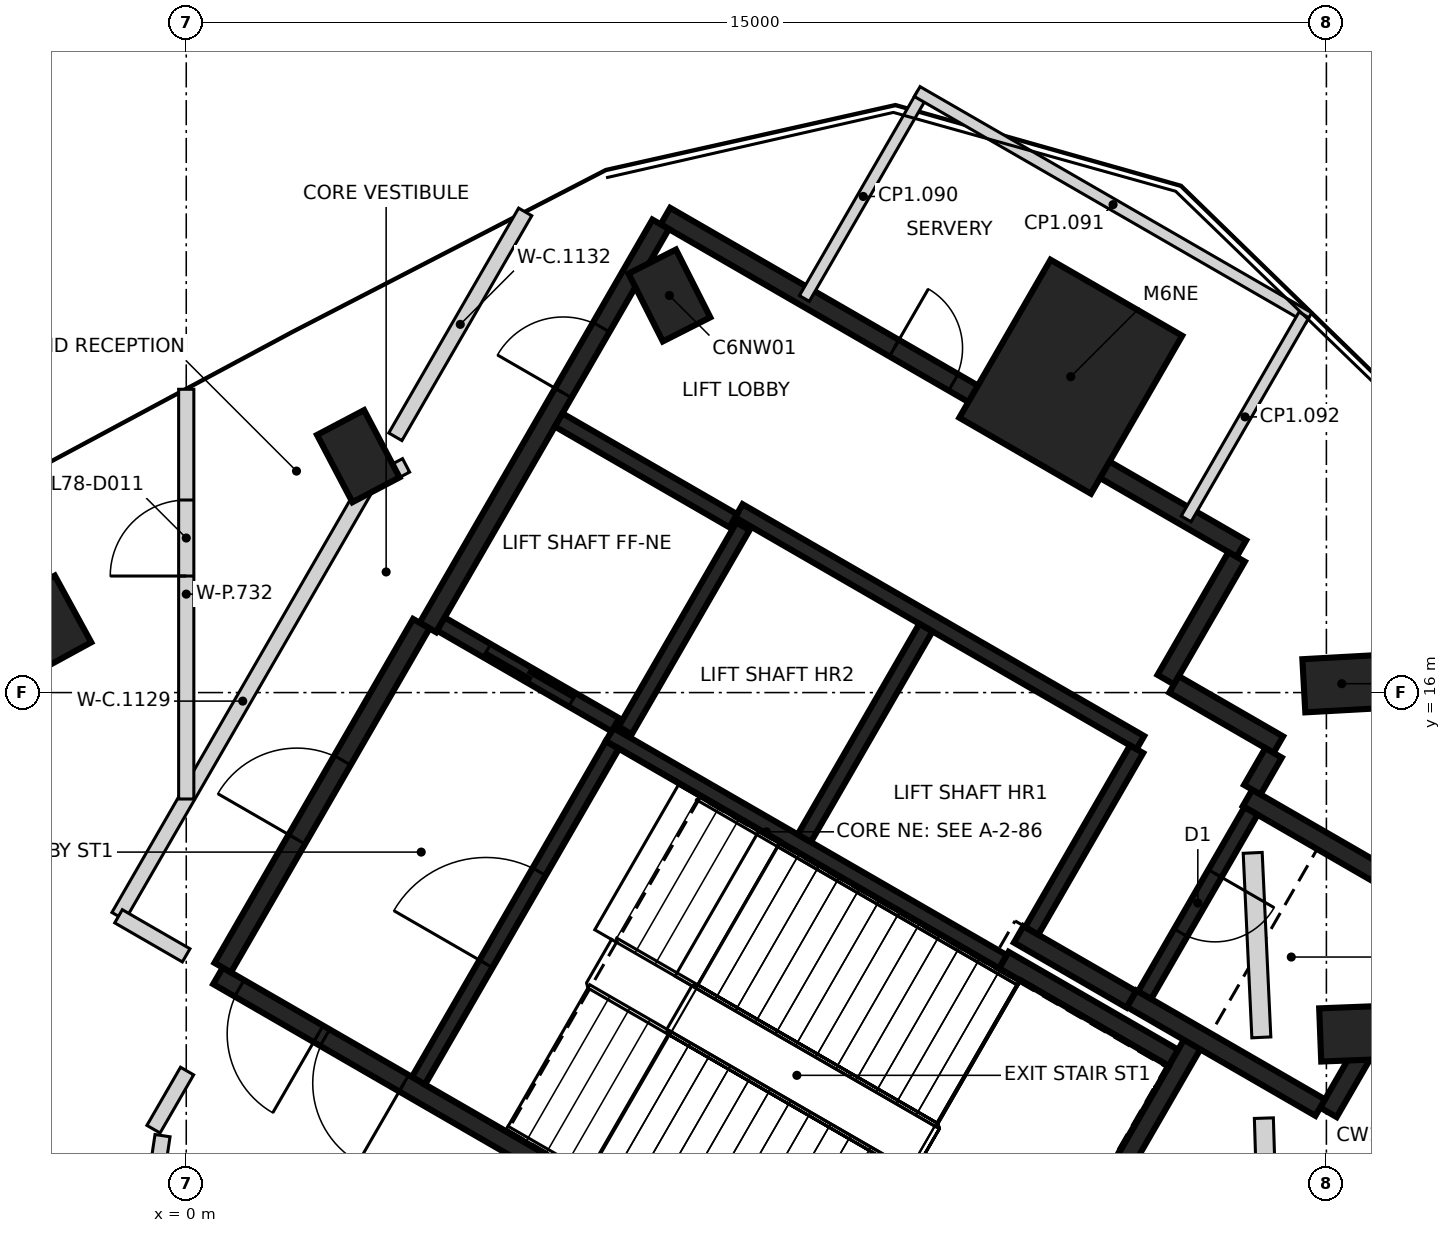
"""IFC4 building model, lengths in metres.
Left out: names, types, materials, properties, quantities, classifications, styles, units other than length and angle.
Written with IfcOpenShell. Run it as: python <this file> out.ifc"""

import sys

from ifc_helpers import new_model, si_unit, direction, frame, frame_2d, origin, origin_2d, place, context, subcontext, project, spatial, rectangle, extrude, element, fill, save


model = new_model("IFC4")
c1 = context("Model", 3, precision=1e-05, world=origin(), true_north=direction((0.0, 1.0)))
c2 = subcontext(c1, "Body", "Model", "MODEL_VIEW")
j1 = project(units=[si_unit("LENGTHUNIT", "METRE"), si_unit("PLANEANGLEUNIT", "RADIAN")], contexts=[c1])
p1 = place(None, origin())
s1 = spatial("IfcSite", under=j1, at=p1, CompositionType="ELEMENT")
p2 = place(p1, origin())
s2 = spatial("IfcBuilding", under=s1, at=p2, CompositionType="ELEMENT")
p3 = place(p2, frame((0.0, 0.0, 312.6)))
s3 = spatial("IfcBuildingStorey", under=s2, at=p3, CompositionType="ELEMENT", Elevation=312.6)
for number, where, z_axis, x_axis in (
    (1, (15.418, 11.515, -0.35), (0.0, 0.0, 1.0), (0.999, 0.039, 0.0)),
    (2, (15.202, 16.117, -0.35), (0.0, 0.0, 1.0), (0.998, 0.055, 0.0)),
    (3, (6.356, 21.224, -0.35), (0.0, 0.0, 1.0), (-0.452, 0.892, 0.0)),
    (4, (2.263, 19.11, -0.35), (0.0, 0.0, 1.0), (-0.466, 0.885, 0.0)),
    (5, (-1.797, 16.932, -0.35), (0.0, 0.0, 1.0), (-0.479, 0.878, 0.0)),
):
    element("IfcColumn", number, at=place(p3, frame(where, z_axis=z_axis, x_axis=x_axis)), inside=s3, PredefinedType="COLUMN", context=c2, shape_type="SweptSolid", body=[
        extrude(rectangle(XDim=1.0, YDim=0.7, at=origin_2d()), origin(), (0.0, 0.0, 1.0), 8.1),
    ])
p4 = place(p3, frame((11.637, 20.155, -0.35), z_axis=(0.0, 0.0, 1.0), x_axis=(0.5, 0.866025403784, 0.0)))
e6 = element("IfcColumn", 6, at=p4, inside=s3, PredefinedType="COLUMN", context=c2, shape_type="SweptSolid", body=[
    extrude(rectangle(XDim=2.4, YDim=2.0, at=origin_2d()), origin(), (0.0, 0.0, 1.0), 8.1),
])
p5 = place(p3, frame((14.177, 10.401, 0.0), z_axis=(0.0, 0.0, 1.0), x_axis=(0.031249894825, -0.999511602771, 0.0)))
e7 = element("IfcWall", 7, at=p5, inside=s3, PredefinedType="SOLIDWALL", context=c2, shape_type="SweptSolid", body=[
    extrude(rectangle(XDim=3.523, YDim=0.25, at=frame_2d((1.762, 0.0))), origin(), (0.0, 0.0, 1.0), 7.75),
])
p6 = place(p5, frame((2.062, 0.0, 0.9)))
e8 = element("IfcOpeningElement", 8, at=p6, cuts=e7, PredefinedType="OPENING", context=c2, shape_type="SweptSolid", body=[
    extrude(rectangle(XDim=1.2, YDim=2.4, at=frame_2d((0.6, 1.2))), frame((0.0, 0.135, 0.0), z_axis=(0.0, -1.0, 0.0), x_axis=(1.0, 0.0, 0.0)), (0.0, 0.0, 1.0), 0.27),
])
p7 = place(p3, frame((14.03, 13.891, 0.0), z_axis=(0.0, 0.0, 1.0), x_axis=(0.046815754834, -0.998903541439, 0.0)))
e9 = element("IfcWall", 9, at=p7, inside=s3, PredefinedType="SOLIDWALL", context=c2, shape_type="SweptSolid", body=[
    extrude(rectangle(XDim=2.43, YDim=0.25, at=frame_2d((1.215, 0.0))), origin(), (0.0, 0.0, 1.0), 7.75),
])
p8 = place(p3, frame((10.42, 6.498, 0.0), z_axis=(0.0, 0.0, 1.0), x_axis=(-0.866021906294, 0.500006057782, 0.0)))
e10 = element("IfcWall", 10, at=p8, inside=s3, PredefinedType="SHEAR", context=c2, shape_type="SweptSolid", body=[
    extrude(rectangle(XDim=11.55, YDim=0.25, at=frame_2d((5.775, 0.0))), origin(), (0.0, 0.0, 1.0), 7.75),
])
p9 = place(p8, frame((10.025, 0.0, 0.0)))
e11 = element("IfcOpeningElement", 11, at=p9, cuts=e10, PredefinedType="OPENING", context=c2, shape_type="SweptSolid", body=[
    extrude(rectangle(XDim=1.2, YDim=2.1, at=frame_2d((0.6, 1.05))), frame((0.0, 0.135, 0.0), z_axis=(0.0, -1.0, 0.0), x_axis=(1.0, 0.0, 0.0)), (0.0, 0.0, 1.0), 0.27),
])
p10 = place(p8, frame((8.725, 0.0, 0.0)))
e12 = element("IfcOpeningElement", 12, at=p10, cuts=e10, PredefinedType="OPENING", context=c2, shape_type="SweptSolid", body=[
    extrude(rectangle(XDim=1.2, YDim=2.1, at=frame_2d((0.6, 1.05))), frame((0.0, 0.135, 0.0), z_axis=(0.0, -1.0, 0.0), x_axis=(1.0, 0.0, 0.0)), (0.0, 0.0, 1.0), 0.27),
])
p11 = place(p3, frame((6.304, 22.269, 0.0), z_axis=(0.0, 0.0, 1.0), x_axis=(0.866022959057, -0.500004234368, 0.0)))
e13 = element("IfcWall", 13, at=p11, inside=s3, PredefinedType="SHEAR", context=c2, shape_type="SweptSolid", body=[
    extrude(rectangle(XDim=8.75, YDim=0.25, at=frame_2d((4.375, 0.0))), origin(), (0.0, 0.0, 1.0), 7.75),
])
p12 = place(p11, frame((3.475, 0.0, 0.0)))
e14 = element("IfcOpeningElement", 14, at=p12, cuts=e13, PredefinedType="OPENING", context=c2, shape_type="SweptSolid", body=[
    extrude(rectangle(XDim=0.9, YDim=2.1, at=frame_2d((0.45, 1.05))), frame((0.0, 0.135, 0.0), z_axis=(0.0, -1.0, 0.0), x_axis=(1.0, 0.0, 0.0)), (0.0, 0.0, 1.0), 0.27),
])
p13 = place(p3, frame((3.179, 16.856, 0.0), z_axis=(0.0, 0.0, 1.0), x_axis=(0.500001955336, 0.866024274868, 0.0)))
e15 = element("IfcWall", 15, at=p13, inside=s3, PredefinedType="SHEAR", context=c2, shape_type="SweptSolid", body=[
    extrude(rectangle(XDim=6.125, YDim=0.25, at=frame_2d((3.062, 0.0))), origin(), (0.0, 0.0, 1.0), 7.75),
])
p14 = place(p13, frame((3.563, 0.0, 0.0)))
e16 = element("IfcOpeningElement", 16, at=p14, cuts=e15, PredefinedType="OPENING", context=c2, shape_type="SweptSolid", body=[
    extrude(rectangle(XDim=1.0, YDim=2.1, at=frame_2d((0.5, 1.05))), frame((0.0, 0.135, 0.0), z_axis=(0.0, -1.0, 0.0), x_axis=(1.0, 0.0, 0.0)), (0.0, 0.0, 1.0), 0.27),
])
p15 = place(p3, frame((0.48, 12.381, 0.0), z_axis=(0.0, 0.0, 1.0), x_axis=(0.49999885962, 0.866026062182, 0.0)))
e17 = element("IfcWall", 17, at=p15, inside=s3, PredefinedType="SHEAR", context=c2, shape_type="SweptSolid", body=[
    extrude(rectangle(XDim=5.225, YDim=0.25, at=frame_2d((2.612, 0.0))), origin(), (0.0, 0.0, 1.0), 7.75),
])
p16 = place(p15, frame((1.949, 0.0, 0.0)))
e18 = element("IfcOpeningElement", 18, at=p16, cuts=e17, PredefinedType="OPENING", context=c2, shape_type="SweptSolid", body=[
    extrude(rectangle(XDim=1.2, YDim=2.1, at=frame_2d((0.6, 1.05))), frame((0.0, 0.135, 0.0), z_axis=(0.0, -1.0, 0.0), x_axis=(1.0, 0.0, 0.0)), (0.0, 0.0, 1.0), 0.27),
])
p17 = place(p3, frame((13.238, 11.378, 0.0), z_axis=(0.0, 0.0, 1.0), x_axis=(-0.500008851346, -0.866020293397, 0.0)))
e19 = element("IfcWall", 19, at=p17, inside=s3, PredefinedType="SHEAR", context=c2, shape_type="SweptSolid", body=[
    extrude(rectangle(XDim=5.51, YDim=0.25, at=frame_2d((2.755, 0.0))), origin(), (0.0, 0.0, 1.0), 7.75),
])
p18 = place(p3, frame((16.552, 13.119, 0.0), z_axis=(0.0, 0.0, 1.0), x_axis=(-0.499978833458, -0.866037623948, 0.0)))
e20 = element("IfcWall", 20, at=p18, inside=s3, PredefinedType="SHEAR", context=c2, shape_type="SweptSolid", body=[
    extrude(rectangle(XDim=3.05, YDim=0.25, at=frame_2d((1.525, 0.0))), origin(), (0.0, 0.0, 1.0), 7.75),
])
p19 = place(p3, frame((14.918, 10.54, 0.0), z_axis=(0.0, 0.0, 1.0), x_axis=(-0.866063538972, 0.499933942099, 0.0)))
e21 = element("IfcWall", 21, at=p19, inside=s3, PredefinedType="SHEAR", context=c2, shape_type="SweptSolid", body=[
    extrude(rectangle(XDim=2.865, YDim=0.25, at=frame_2d((1.432, 0.0))), origin(), (0.0, 0.0, 1.0), 7.75),
])
p20 = place(p3, frame((13.963, 14.614, 0.0), z_axis=(0.0, 0.0, 1.0), x_axis=(0.866042235819, -0.499970844928, 0.0)))
e22 = element("IfcWall", 22, at=p20, inside=s3, PredefinedType="SHEAR", context=c2, shape_type="SweptSolid", body=[
    extrude(rectangle(XDim=2.865, YDim=0.25, at=frame_2d((1.432, 0.0))), origin(), (0.0, 0.0, 1.0), 7.75),
])
p21 = place(p3, frame((10.757, 12.481, 0.0), z_axis=(0.0, 0.0, 1.0), x_axis=(0.866022940537, -0.500004266446, 0.0)))
e23 = element("IfcWall", 23, at=p21, inside=s3, PredefinedType="SHEAR", context=c2, shape_type="SweptSolid", body=[
    extrude(rectangle(XDim=2.575, YDim=0.25, at=frame_2d((1.287, 0.0))), origin(), (0.0, 0.0, 1.0), 7.75),
])
p22 = place(p3, frame((13.819, 17.785, 0.0), z_axis=(0.0, 0.0, 1.0), x_axis=(-0.500039802285, -0.866002422705, 0.0)))
e24 = element("IfcWall", 24, at=p22, inside=s3, PredefinedType="SHEAR", context=c2, shape_type="SweptSolid", body=[
    extrude(rectangle(XDim=1.865, YDim=0.25, at=frame_2d((0.932, 0.0))), origin(), (0.0, 0.0, 1.0), 7.75),
])
p23 = place(p3, frame((12.433, 11.964, 0.0), z_axis=(0.0, 0.0, 1.0), x_axis=(-0.866038183914, 0.499977863513, 0.0)))
e25 = element("IfcWall", 25, at=p23, inside=s3, PredefinedType="SHEAR", context=c2, shape_type="SweptSolid", body=[
    extrude(rectangle(XDim=1.71, YDim=0.25, at=frame_2d((0.855, 0.0))), origin(), (0.0, 0.0, 1.0), 7.75),
])
p24 = place(p3, frame((12.995, 16.108, 0.0), z_axis=(0.0, 0.0, 1.0), x_axis=(0.866044474677, -0.49996696679, 0.0)))
e26 = element("IfcWall", 26, at=p24, inside=s3, PredefinedType="SHEAR", context=c2, shape_type="SweptSolid", body=[
    extrude(rectangle(XDim=1.584, YDim=0.25, at=frame_2d((0.792, 0.0))), origin(), (0.0, 0.0, 1.0), 7.75),
])
p25 = place(p3, frame((14.305, 15.207, 0.0), z_axis=(0.0, 0.0, 1.0), x_axis=(-0.499848422343, -0.866112899501, 0.0)))
e27 = element("IfcWall", 27, at=p25, inside=s3, PredefinedType="SHEAR", context=c2, shape_type="SweptSolid", body=[
    extrude(rectangle(XDim=0.559, YDim=0.25, at=frame_2d((0.28, 0.0))), origin(), (0.0, 0.0, 1.0), 7.75),
])
p26 = place(p3, frame((12.552, 15.342, 0.0), z_axis=(0.0, 0.0, 1.0), x_axis=(-0.866030299012, 0.499991521122, 0.0)))
e28 = element("IfcWall", 28, at=p26, inside=s3, PredefinedType="SHEAR", context=c2, shape_type="SweptSolid", body=[
    extrude(rectangle(XDim=6.1, YDim=0.2, at=frame_2d((3.05, 0.0))), origin(), (0.0, 0.0, 1.0), 7.75),
])
p27 = place(p3, frame((10.743, 12.46, 0.0), z_axis=(0.0, 0.0, 1.0), x_axis=(-0.866018848283, 0.500011354289, 0.0)))
e29 = element("IfcWall", 29, at=p27, inside=s3, PredefinedType="SHEAR", context=c2, shape_type="SweptSolid", body=[
    extrude(rectangle(XDim=5.974, YDim=0.2, at=frame_2d((2.987, 0.0))), origin(), (0.0, 0.0, 1.0), 7.75),
])
p28 = place(p3, frame((3.057, 10.895, 0.0), z_axis=(0.0, 0.0, 1.0), x_axis=(0.500027839223, 0.866009330205, 0.0)))
e30 = element("IfcWall", 30, at=p28, inside=s3, PredefinedType="SHEAR", context=c2, shape_type="SweptSolid", body=[
    extrude(rectangle(XDim=5.098, YDim=0.2, at=frame_2d((2.549, 0.0))), origin(), (0.0, 0.0, 1.0), 7.75),
])
p29 = place(p28, frame((1.774, 0.0, 0.0)))
e31 = element("IfcOpeningElement", 31, at=p29, cuts=e30, PredefinedType="OPENING", context=c2, shape_type="SweptSolid", body=[
    extrude(rectangle(XDim=1.4, YDim=2.1, at=frame_2d((0.7, 1.05))), frame((0.0, 0.11, 0.0), z_axis=(0.0, -1.0, 0.0), x_axis=(1.0, 0.0, 0.0)), (0.0, 0.0, 1.0), 0.22),
])
p30 = place(p3, frame((8.132, 14.084, 0.0), z_axis=(0.0, 0.0, 1.0), x_axis=(0.500030834389, 0.86600760081, 0.0)))
e32 = element("IfcWall", 32, at=p30, inside=s3, PredefinedType="SHEAR", context=c2, shape_type="SweptSolid", body=[
    extrude(rectangle(XDim=3.198, YDim=0.2, at=frame_2d((1.599, 0.0))), origin(), (0.0, 0.0, 1.0), 7.75),
])
p31 = place(p3, frame((14.008, 14.442, 0.0), z_axis=(0.0, 0.0, 1.0), x_axis=(-0.499986818241, -0.866033014143, 0.0)))
e33 = element("IfcWall", 33, at=p31, inside=s3, PredefinedType="SHEAR", context=c2, shape_type="SweptSolid", body=[
    extrude(rectangle(XDim=2.798, YDim=0.2, at=frame_2d((1.399, 0.0))), origin(), (0.0, 0.0, 1.0), 7.75),
])
p32 = place(p31, frame((0.949, 0.0, 0.0)))
e34 = element("IfcOpeningElement", 34, at=p32, cuts=e33, PredefinedType="OPENING", context=c2, shape_type="SweptSolid", body=[
    extrude(rectangle(XDim=0.9, YDim=2.1, at=frame_2d((0.45, 1.05))), frame((0.0, 0.11, 0.0), z_axis=(0.0, -1.0, 0.0), x_axis=(1.0, 0.0, 0.0)), (0.0, 0.0, 1.0), 0.22),
])
p33 = place(p3, frame((12.502, 15.255, 0.0), z_axis=(0.0, 0.0, 1.0), x_axis=(-0.499965018551, -0.866045599391, 0.0)))
e35 = element("IfcWall", 35, at=p33, inside=s3, PredefinedType="SHEAR", context=c2, shape_type="SweptSolid", body=[
    extrude(rectangle(XDim=2.759, YDim=0.2, at=frame_2d((1.379, 0.0))), origin(), (0.0, 0.0, 1.0), 7.75),
])
p34 = place(p3, frame((7.324, 18.187, 0.0), z_axis=(0.0, 0.0, 1.0), x_axis=(-0.499967891604, -0.866043940782, 0.0)))
e36 = element("IfcWall", 36, at=p34, inside=s3, PredefinedType="SHEAR", context=c2, shape_type="SweptSolid", body=[
    extrude(rectangle(XDim=3.1, YDim=0.2, at=frame_2d((1.55, 0.0))), origin(), (0.0, 0.0, 1.0), 7.75),
])
p35 = place(p3, frame((5.646, 15.576, 0.0), z_axis=(0.0, 0.0, 1.0), x_axis=(-0.866018407898, 0.500012117035, 0.0)))
e37 = element("IfcWall", 37, at=p35, inside=s3, PredefinedType="SHEAR", context=c2, shape_type="SweptSolid", body=[
    extrude(rectangle(XDim=2.651, YDim=0.2, at=frame_2d((1.325, 0.0))), origin(), (0.0, 0.0, 1.0), 7.75),
])
p36 = place(p35, frame((0.652, 0.0, 0.0)))
e38 = element("IfcOpeningElement", 38, at=p36, cuts=e37, PredefinedType="OPENING", context=c2, shape_type="SweptSolid", body=[
    extrude(rectangle(XDim=1.3, YDim=2.1, at=frame_2d((0.65, 1.05))), frame((0.0, 0.11, 0.0), z_axis=(0.0, -1.0, 0.0), x_axis=(1.0, 0.0, 0.0)), (0.0, 0.0, 1.0), 0.22),
])
p37 = place(p3, frame((7.196, 18.26, 0.0), z_axis=(0.0, 0.0, 1.0), x_axis=(-0.866018407898, 0.500012117035, 0.0)))
e39 = element("IfcWall", 39, at=p37, inside=s3, PredefinedType="SHEAR", context=c2, shape_type="SweptSolid", body=[
    extrude(rectangle(XDim=2.651, YDim=0.2, at=frame_2d((1.325, 0.0))), origin(), (0.0, 0.0, 1.0), 7.75),
])
p38 = place(p3, frame((8.132, 21.185, 0.0), z_axis=(0.0, 0.0, 1.0), x_axis=(0.49999285859, 0.86602952684, 0.0)))
e40 = element("IfcWall", 40, at=p38, inside=s3, PredefinedType="PARTITIONING", context=c2, shape_type="SweptSolid", body=[
    extrude(rectangle(XDim=3.1, YDim=0.15, at=frame_2d((1.55, 0.0))), origin(), (0.0, 0.0, 1.0), 7.75),
])
p39 = place(p3, frame((9.617, 23.907, 0.0), z_axis=(0.0, 0.0, 1.0), x_axis=(0.866045517703, -0.499965160052, 0.0)))
e41 = element("IfcWall", 41, at=p39, inside=s3, PredefinedType="PARTITIONING", context=c2, shape_type="SweptSolid", body=[
    extrude(rectangle(XDim=5.95, YDim=0.15, at=frame_2d((2.975, 0.0))), origin(), (0.0, 0.0, 1.0), 7.75),
])
p40 = place(p3, frame((14.705, 20.969, 0.0), z_axis=(0.0, 0.0, 1.0), x_axis=(-0.499967891604, -0.866043940782, 0.0)))
e42 = element("IfcWall", 42, at=p40, inside=s3, PredefinedType="PARTITIONING", context=c2, shape_type="SweptSolid", body=[
    extrude(rectangle(XDim=3.1, YDim=0.15, at=frame_2d((1.55, 0.0))), origin(), (0.0, 0.0, 1.0), 7.75),
])
p41 = place(p3, frame((-0.891, 13.057, 0.0), z_axis=(0.0, 0.0, 1.0), x_axis=(0.500039268703, 0.866002730801, 0.0)))
e43 = element("IfcWall", 43, at=p41, inside=s3, PredefinedType="PARTITIONING", context=c2, shape_type="SweptSolid", body=[
    extrude(rectangle(XDim=6.537, YDim=0.2, at=frame_2d((3.269, 0.0))), origin(), (0.0, 0.0, 1.0), 7.75),
])
p42 = place(p3, frame((-0.891, 13.057, 0.0), z_axis=(0.0, 0.0, 1.0), x_axis=(0.866027366358, -0.499996600708, 0.0)))
e44 = element("IfcWall", 44, at=p42, inside=s3, PredefinedType="PARTITIONING", context=c2, shape_type="SweptSolid", body=[
    extrude(rectangle(XDim=1.028, YDim=0.2, at=frame_2d((0.514, 0.0))), origin(), (0.0, 0.0, 1.0), 7.75),
])
p43 = place(p3, frame((2.378, 18.718, 0.0), z_axis=(0.0, 0.0, 1.0), x_axis=(0.884644712556, 0.466265731689, 0.0)))
e45 = element("IfcWall", 45, at=p43, inside=s3, PredefinedType="PARTITIONING", context=c2, shape_type="SweptSolid", body=[
    extrude(rectangle(XDim=0.581, YDim=0.2, at=frame_2d((0.291, 0.0))), origin(), (0.0, 0.0, 1.0), 7.75),
])
p44 = place(p3, frame((2.751, 19.365, 0.0), z_axis=(0.0, 0.0, 1.0), x_axis=(0.50003588027, 0.86600468731, 0.0)))
e46 = element("IfcWall", 46, at=p44, inside=s3, PredefinedType="PARTITIONING", context=c2, shape_type="SweptSolid", body=[
    extrude(rectangle(XDim=3.416, YDim=0.2, at=frame_2d((1.708, 0.0))), origin(), (0.0, 0.0, 1.0), 7.75),
])
p45 = place(p3, frame((-6.507, 16.421, 0.0), z_axis=(0.0, 0.0, 1.0), x_axis=(0.368383356077, -0.929673976706, 0.0)))
e47 = element("IfcWall", 47, at=p45, inside=s3, PredefinedType="PARTITIONING", context=c2, shape_type="SweptSolid", body=[
    extrude(rectangle(XDim=14.258, YDim=0.2, at=frame_2d((7.129, 0.0))), origin(), (0.0, 0.0, 1.0), 7.75),
])
p46 = place(p3, frame((-1.283, 3.707, 0.0), z_axis=(0.0, 0.0, 1.0), x_axis=(0.148545012809, 0.988905647253, 0.0)))
e48 = element("IfcWall", 48, at=p46, inside=s3, PredefinedType="PARTITIONING", context=c2, shape_type="SweptSolid", body=[
    extrude(rectangle(XDim=6.536, YDim=0.2, at=frame_2d((3.268, 0.0))), origin(), (0.0, 0.0, 1.0), 7.75),
])
p47 = place(p46, frame((2.868, 0.0, 0.0)))
e49 = element("IfcOpeningElement", 49, at=p47, cuts=e48, PredefinedType="OPENING", context=c2, shape_type="SweptSolid", body=[
    extrude(rectangle(XDim=0.8, YDim=2.1, at=frame_2d((0.4, 1.05))), frame((0.0, 0.11, 0.0), z_axis=(0.0, -1.0, 0.0), x_axis=(1.0, 0.0, 0.0)), (0.0, 0.0, 1.0), 0.22),
])
p48 = place(p3, frame((-0.431, 10.256, 0.0), z_axis=(0.0, 0.0, 1.0), x_axis=(0.500240760917, 0.865886355775, 0.0)))
e50 = element("IfcWall", 50, at=p48, inside=s3, PredefinedType="PARTITIONING", context=c2, shape_type="SweptSolid", body=[
    extrude(rectangle(XDim=0.883, YDim=0.2, at=frame_2d((0.442, 0.0))), origin(), (0.0, 0.0, 1.0), 7.75),
])
p49 = place(p3, frame((0.0, 14.6, 0.0), z_axis=(0.0, 0.0, 1.0), x_axis=(0.0, 1.0, 0.0)))
e51 = element("IfcWall", 51, at=p49, inside=s3, PredefinedType="PARTITIONING", context=c2, shape_type="SweptSolid", body=[
    extrude(rectangle(XDim=5.39, YDim=0.2, at=frame_2d((2.695, 0.0))), origin(), (0.0, 0.0, 1.0), 7.75),
])
p50 = place(p49, frame((2.933, 0.0, 0.0)))
e52 = element("IfcOpeningElement", 52, at=p50, cuts=e51, PredefinedType="OPENING", context=c2, shape_type="SweptSolid", body=[
    extrude(rectangle(XDim=1.0, YDim=2.1, at=frame_2d((0.5, 1.05))), frame((0.0, 0.11, 0.0), z_axis=(0.0, -1.0, 0.0), x_axis=(1.0, 0.0, 0.0)), (0.0, 0.0, 1.0), 0.22),
])
p51 = place(p36, origin())
e53 = element("IfcDoor", 53, at=p51, inside=s3, OperationType="SLIDING_TO_RIGHT", PredefinedType="DOOR", context=c2, shape_type="SweptSolid", body=[
    extrude(rectangle(XDim=1.3, YDim=2.1, at=frame_2d((0.65, 1.05))), frame((0.0, 0.025, 0.0), z_axis=(0.0, -1.0, 0.0), x_axis=(1.0, 0.0, 0.0)), (0.0, 0.0, 1.0), 0.05),
])
fill(e38, e53)
p52 = place(p14, origin())
e54 = element("IfcDoor", 54, at=p52, inside=s3, OperationType="SINGLE_SWING_LEFT", PredefinedType="DOOR", context=c2, shape_type="SweptSolid", body=[
    extrude(rectangle(XDim=1.0, YDim=2.1, at=frame_2d((0.5, 1.05))), frame((0.0, 0.025, 0.0), z_axis=(0.0, -1.0, 0.0), x_axis=(1.0, 0.0, 0.0)), (0.0, 0.0, 1.0), 0.05),
])
fill(e16, e54)
p53 = place(p9, origin())
e55 = element("IfcDoor", 55, at=p53, inside=s3, OperationType="SINGLE_SWING_LEFT", PredefinedType="DOOR", context=c2, shape_type="SweptSolid", body=[
    extrude(rectangle(XDim=1.2, YDim=2.1, at=frame_2d((0.6, 1.05))), frame((0.0, 0.025, 0.0), z_axis=(0.0, -1.0, 0.0), x_axis=(1.0, 0.0, 0.0)), (0.0, 0.0, 1.0), 0.05),
])
fill(e11, e55)
p54 = place(p10, origin())
e56 = element("IfcDoor", 56, at=p54, inside=s3, OperationType="SINGLE_SWING_RIGHT", PredefinedType="DOOR", context=c2, shape_type="SweptSolid", body=[
    extrude(rectangle(XDim=1.2, YDim=2.1, at=frame_2d((0.6, 1.05))), frame((0.0, 0.025, 0.0), z_axis=(0.0, -1.0, 0.0), x_axis=(1.0, 0.0, 0.0)), (0.0, 0.0, 1.0), 0.05),
])
fill(e12, e56)
p55 = place(p16, origin())
e57 = element("IfcDoor", 57, at=p55, inside=s3, OperationType="SINGLE_SWING_LEFT", PredefinedType="DOOR", context=c2, shape_type="SweptSolid", body=[
    extrude(rectangle(XDim=1.2, YDim=2.1, at=frame_2d((0.6, 1.05))), frame((0.0, 0.025, 0.0), z_axis=(0.0, -1.0, 0.0), x_axis=(1.0, 0.0, 0.0)), (0.0, 0.0, 1.0), 0.05),
])
fill(e18, e57)
p56 = place(p29, origin())
e58 = element("IfcDoor", 58, at=p56, inside=s3, OperationType="SINGLE_SWING_LEFT", PredefinedType="DOOR", context=c2, shape_type="SweptSolid", body=[
    extrude(rectangle(XDim=1.4, YDim=2.1, at=frame_2d((0.7, 1.05))), frame((0.0, 0.025, 0.0), z_axis=(0.0, -1.0, 0.0), x_axis=(1.0, 0.0, 0.0)), (0.0, 0.0, 1.0), 0.05),
])
fill(e31, e58)
p57 = place(p32, origin())
e59 = element("IfcDoor", 59, at=p57, inside=s3, OperationType="SINGLE_SWING_RIGHT", PredefinedType="DOOR", context=c2, shape_type="SweptSolid", body=[
    extrude(rectangle(XDim=0.9, YDim=2.1, at=frame_2d((0.45, 1.05))), frame((0.0, 0.025, 0.0), z_axis=(0.0, -1.0, 0.0), x_axis=(1.0, 0.0, 0.0)), (0.0, 0.0, 1.0), 0.05),
])
fill(e34, e59)
p58 = place(p12, origin())
e60 = element("IfcDoor", 60, at=p58, inside=s3, OperationType="SINGLE_SWING_LEFT", PredefinedType="DOOR", context=c2, shape_type="SweptSolid", body=[
    extrude(rectangle(XDim=0.9, YDim=2.1, at=frame_2d((0.45, 1.05))), frame((0.0, 0.025, 0.0), z_axis=(0.0, -1.0, 0.0), x_axis=(1.0, 0.0, 0.0)), (0.0, 0.0, 1.0), 0.05),
])
fill(e14, e60)
p59 = place(p50, frame((1.0, 0.0, 0.0), z_axis=(0.0, 0.0, 1.0), x_axis=(-1.0, 0.0, 0.0)))
e61 = element("IfcDoor", 61, at=p59, inside=s3, OperationType="SINGLE_SWING_LEFT", PredefinedType="DOOR", context=c2, shape_type="SweptSolid", body=[
    extrude(rectangle(XDim=1.0, YDim=2.1, at=frame_2d((0.5, 1.05))), frame((0.0, 0.025, 0.0), z_axis=(0.0, -1.0, 0.0), x_axis=(1.0, 0.0, 0.0)), (0.0, 0.0, 1.0), 0.05),
])
fill(e52, e61)
save(model, sys.argv[1])
